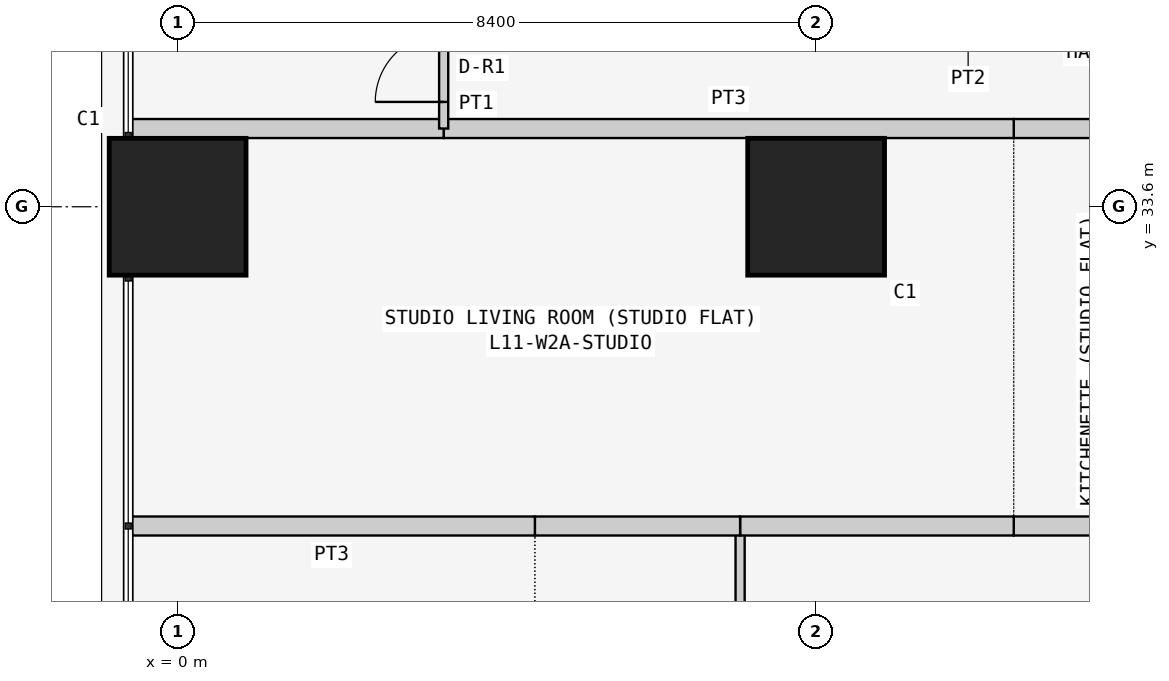
"""IFC4 building model, lengths in metres.
Left out: names, types, materials, properties, quantities, classifications, styles, units other than length and angle.
Written with IfcOpenShell. Run it as: python <this file> out.ifc"""

import sys

from ifc_helpers import new_model, si_unit, direction, frame, frame_2d, origin, origin_2d, place, context, subcontext, project, spatial, rectangle, extrude, element, fill, save


model = new_model("IFC4")
c1 = context("Model", 3, precision=1e-05, world=origin(), true_north=direction((0.0, 1.0)))
c2 = subcontext(c1, "Body", "Model", "MODEL_VIEW")
j1 = project(units=[si_unit("LENGTHUNIT", "METRE"), si_unit("PLANEANGLEUNIT", "RADIAN")], contexts=[c1])
p1 = place(None, origin())
s1 = spatial("IfcSite", under=j1, at=p1, CompositionType="ELEMENT")
p2 = place(p1, origin())
s2 = spatial("IfcBuilding", under=s1, at=p2, CompositionType="ELEMENT")
p3 = place(p2, frame((0.0, 0.0, 48.9)))
s3 = spatial("IfcBuildingStorey", under=s2, at=p3, CompositionType="ELEMENT", Elevation=48.9)
for number, where, z_axis, x_axis in (
    (1, (0.0, 33.6, 0.0), (0.0, 0.0, 1.0), (1.0, 0.0, 0.0)),
    (2, (8.4, 33.6, 0.0), (0.0, 0.0, 1.0), (1.0, 0.0, 0.0)),
):
    element("IfcColumn", number, at=place(p3, frame(where, z_axis=z_axis, x_axis=x_axis)), inside=s3, PredefinedType="COLUMN", context=c2, shape_type="SweptSolid", body=[
        extrude(rectangle(XDim=1.8, YDim=1.8, at=origin_2d()), origin(), (0.0, 0.0, 1.0), 3.6),
    ])
p4 = place(p3, frame((7.4, 29.4, 0.0), z_axis=(0.0, 0.0, 1.0), x_axis=(0.0, -1.0, 0.0)))
e3 = element("IfcWall", 3, at=p4, inside=s3, PredefinedType="PARTITIONING", context=c2, shape_type="SweptSolid", body=[
    extrude(rectangle(XDim=5.229, YDim=0.12, at=frame_2d((2.615, 0.0))), origin(), (0.0, 0.0, 1.0), 3.45),
])
p5 = place(p3, frame((12.2, 29.4, 0.0), z_axis=(0.0, 0.0, 1.0), x_axis=(-1.0, 0.0, 0.0)))
e4 = element("IfcWall", 4, at=p5, inside=s3, PredefinedType="PARTITIONING", context=c2, shape_type="SweptSolid", body=[
    extrude(rectangle(XDim=1.2, YDim=0.25, at=frame_2d((0.6, 0.0))), origin(), (0.0, 0.0, 1.0), 3.45),
])
p6 = place(p3, frame((11.0, 29.4, 0.0), z_axis=(0.0, 0.0, 1.0), x_axis=(-1.0, 0.0, 0.0)))
e5 = element("IfcWall", 5, at=p6, inside=s3, PredefinedType="PARTITIONING", context=c2, shape_type="SweptSolid", body=[
    extrude(rectangle(XDim=3.6, YDim=0.25, at=frame_2d((1.8, 0.0))), origin(), (0.0, 0.0, 1.0), 3.45),
])
p7 = place(p3, frame((7.4, 29.4, 0.0), z_axis=(0.0, 0.0, 1.0), x_axis=(-1.0, 0.0, 0.0)))
e6 = element("IfcWall", 6, at=p7, inside=s3, PredefinedType="PARTITIONING", context=c2, shape_type="SweptSolid", body=[
    extrude(rectangle(XDim=2.7, YDim=0.25, at=frame_2d((1.35, 0.0))), origin(), (0.0, 0.0, 1.0), 3.45),
])
p8 = place(p3, frame((4.7, 29.4, 0.0), z_axis=(0.0, 0.0, 1.0), x_axis=(-1.0, 0.0, 0.0)))
e7 = element("IfcWall", 7, at=p8, inside=s3, PredefinedType="PARTITIONING", context=c2, shape_type="SweptSolid", body=[
    extrude(rectangle(XDim=5.35, YDim=0.25, at=frame_2d((2.675, 0.0))), origin(), (0.0, 0.0, 1.0), 3.45),
])
p9 = place(p3, frame((11.0, 34.629, 0.0), z_axis=(0.0, 0.0, 1.0), x_axis=(1.0, 0.0, 0.0)))
e8 = element("IfcWall", 8, at=p9, inside=s3, PredefinedType="PARTITIONING", context=c2, shape_type="SweptSolid", body=[
    extrude(rectangle(XDim=2.4, YDim=0.25, at=frame_2d((1.2, 0.0))), origin(), (0.0, 0.0, 1.0), 3.45),
])
p10 = place(p3, frame((3.5, 34.629, 0.0), z_axis=(0.0, 0.0, 1.0), x_axis=(1.0, 0.0, 0.0)))
e9 = element("IfcWall", 9, at=p10, inside=s3, PredefinedType="PARTITIONING", context=c2, shape_type="SweptSolid", body=[
    extrude(rectangle(XDim=7.5, YDim=0.25, at=frame_2d((3.75, 0.0))), origin(), (0.0, 0.0, 1.0), 3.45),
])
p11 = place(p3, frame((-0.65, 34.629, 0.0), z_axis=(0.0, 0.0, 1.0), x_axis=(1.0, 0.0, 0.0)))
e10 = element("IfcWall", 10, at=p11, inside=s3, PredefinedType="PARTITIONING", context=c2, shape_type="SweptSolid", body=[
    extrude(rectangle(XDim=4.15, YDim=0.25, at=frame_2d((2.075, 0.0))), origin(), (0.0, 0.0, 1.0), 3.45),
])
p12 = place(p3, frame((3.5, 34.629, 0.0), z_axis=(0.0, 0.0, 1.0), x_axis=(0.0, 1.0, 0.0)))
e11 = element("IfcWall", 11, at=p12, inside=s3, PredefinedType="PARTITIONING", context=c2, shape_type="SweptSolid", body=[
    extrude(rectangle(XDim=1.6, YDim=0.12, at=frame_2d((0.8, 0.0))), origin(), (0.0, 0.0, 1.0), 3.45),
])
p13 = place(p12, frame((0.35, 0.0, 0.0)))
e12 = element("IfcOpeningElement", 12, at=p13, cuts=e11, PredefinedType="OPENING", context=c2, shape_type="SweptSolid", body=[
    extrude(rectangle(XDim=0.9, YDim=2.1, at=frame_2d((0.45, 1.05))), frame((0.0, 0.07, 0.0), z_axis=(0.0, -1.0, 0.0), x_axis=(1.0, 0.0, 0.0)), (0.0, 0.0, 1.0), 0.14),
])
p14 = place(p13, origin())
e13 = element("IfcDoor", 13, at=p14, inside=s3, OperationType="SINGLE_SWING_LEFT", PredefinedType="DOOR", context=c2, shape_type="SweptSolid", body=[
    extrude(rectangle(XDim=0.9, YDim=2.1, at=frame_2d((0.45, 1.05))), frame((0.0, 0.025, 0.0), z_axis=(0.0, -1.0, 0.0), x_axis=(1.0, 0.0, 0.0)), (0.0, 0.0, 1.0), 0.05),
])
fill(e12, e13)
save(model, sys.argv[1])
